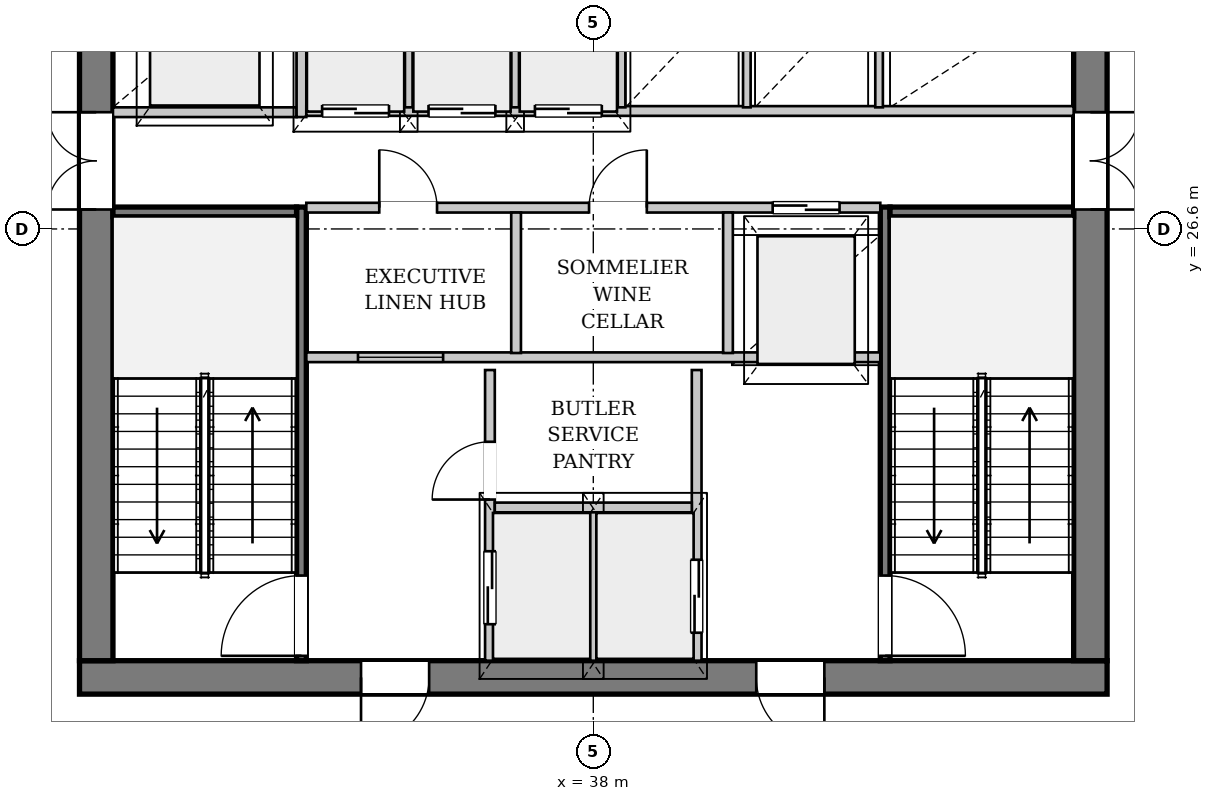
"""IFC4 building model, lengths in metres.
Left out: names, types, materials, properties, quantities, classifications, styles, units other than length and angle.
Written with IfcOpenShell. Run it as: python <this file> out.ifc"""

import sys

from ifc_helpers import new_model, si_unit, direction, frame, frame_2d, origin, place, context, subcontext, project, spatial, rectangle, extrude, source, transform, mapped, element, fill, save


model = new_model("IFC4")
c1 = context("Model", 3, precision=1e-05, world=origin(), true_north=direction((0.0, 1.0)))
c2 = subcontext(c1, "Body", "Model", "MODEL_VIEW")
j1 = project(units=[si_unit("LENGTHUNIT", "METRE"), si_unit("PLANEANGLEUNIT", "RADIAN")], contexts=[c1])
p1 = place(None, origin())
s1 = spatial("IfcSite", under=j1, at=p1, CompositionType="ELEMENT")
p2 = place(p1, origin())
s2 = spatial("IfcBuilding", under=s1, at=p2, CompositionType="ELEMENT")
p3 = place(p2, frame((0.0, 0.0, 196.3)))
s3 = spatial("IfcBuildingStorey", under=s2, at=p3, CompositionType="ELEMENT", Elevation=196.3)
p4 = place(p3, frame((46.45, 19.225, 0.0), z_axis=(0.0, 0.0, 1.0), x_axis=(-1.0, 0.0, 0.0)))
e1 = element("IfcWall", 1, at=p4, inside=s3, PredefinedType="SHEAR", context=c2, shape_type="SweptSolid", body=[
    extrude(rectangle(XDim=16.9, YDim=0.55, at=frame_2d((8.45, 0.0))), origin(), (0.0, 0.0, 1.0), 3.78),
])
p5 = place(p4, frame((4.65, 0.0, 0.0)))
e2 = element("IfcOpeningElement", 2, at=p5, cuts=e1, PredefinedType="OPENING", context=c2, shape_type="SweptSolid", body=[
    extrude(rectangle(XDim=1.12, YDim=2.25, at=frame_2d((0.56, 1.125))), frame((0.0, 0.285, 0.0), z_axis=(0.0, -1.0, 0.0), x_axis=(1.0, 0.0, 0.0)), (0.0, 0.0, 1.0), 0.57),
])
p6 = place(p4, frame((11.15, 0.0, 0.0)))
e3 = element("IfcOpeningElement", 3, at=p6, cuts=e1, PredefinedType="OPENING", context=c2, shape_type="SweptSolid", body=[
    extrude(rectangle(XDim=1.12, YDim=2.25, at=frame_2d((0.56, 1.125))), frame((0.0, 0.285, 0.0), z_axis=(0.0, -1.0, 0.0), x_axis=(1.0, 0.0, 0.0)), (0.0, 0.0, 1.0), 0.57),
])
p7 = place(p3, frame((29.825, 19.5, 0.0), z_axis=(0.0, 0.0, 1.0), x_axis=(0.0, 1.0, 0.0)))
e4 = element("IfcWall", 4, at=p7, inside=s3, PredefinedType="SHEAR", context=c2, shape_type="SweptSolid", body=[
    extrude(rectangle(XDim=14.2, YDim=0.55, at=frame_2d((7.1, 0.0))), origin(), (0.0, 0.0, 1.0), 3.78),
])
p8 = place(p7, frame((7.42, 0.0, 0.0)))
e5 = element("IfcOpeningElement", 5, at=p8, cuts=e4, PredefinedType="OPENING", context=c2, shape_type="SweptSolid", body=[
    extrude(rectangle(XDim=1.6, YDim=2.2, at=frame_2d((0.8, 1.1))), frame((0.0, 0.285, 0.0), z_axis=(0.0, -1.0, 0.0), x_axis=(1.0, 0.0, 0.0)), (0.0, 0.0, 1.0), 0.57),
])
p9 = place(p3, frame((46.175, 33.7, 0.0), z_axis=(0.0, 0.0, 1.0), x_axis=(0.0, -1.0, 0.0)))
e6 = element("IfcWall", 6, at=p9, inside=s3, PredefinedType="SHEAR", context=c2, shape_type="SweptSolid", body=[
    extrude(rectangle(XDim=14.2, YDim=0.55, at=frame_2d((7.1, 0.0))), origin(), (0.0, 0.0, 1.0), 3.78),
])
p10 = place(p9, frame((5.18, 0.0, 0.0)))
e7 = element("IfcOpeningElement", 7, at=p10, cuts=e6, PredefinedType="OPENING", context=c2, shape_type="SweptSolid", body=[
    extrude(rectangle(XDim=1.6, YDim=2.2, at=frame_2d((0.8, 1.1))), frame((0.0, 0.285, 0.0), z_axis=(0.0, -1.0, 0.0), x_axis=(1.0, 0.0, 0.0)), (0.0, 0.0, 1.0), 0.57),
])
p11 = place(p9, frame((2.05, 0.0, 0.0)))
e8 = element("IfcOpeningElement", 8, at=p11, cuts=e6, PredefinedType="OPENING", context=c2, shape_type="SweptSolid", body=[
    extrude(rectangle(XDim=0.95, YDim=2.1, at=frame_2d((0.475, 1.05))), frame((0.0, 0.285, 0.0), z_axis=(0.0, -1.0, 0.0), x_axis=(1.0, 0.0, 0.0)), (0.0, 0.0, 1.0), 0.57),
])
p12 = place(p3, frame((33.2, 19.5, 0.0), z_axis=(0.0, 0.0, 1.0), x_axis=(0.0, 1.0, 0.0)))
e9 = element("IfcWall", 9, at=p12, inside=s3, PredefinedType="PARTITIONING", context=c2, shape_type="SweptSolid", body=[
    extrude(rectangle(XDim=7.46, YDim=0.16, at=frame_2d((3.73, 0.0))), origin(), (0.0, 0.0, 1.0), 3.78),
])
p13 = place(p12, frame((0.08, 0.0, 0.0)))
e10 = element("IfcOpeningElement", 10, at=p13, cuts=e9, PredefinedType="OPENING", context=c2, shape_type="SweptSolid", body=[
    extrude(rectangle(XDim=1.32, YDim=2.2, at=frame_2d((0.66, 1.1))), frame((0.0, 0.09, 0.0), z_axis=(0.0, -1.0, 0.0), x_axis=(1.0, 0.0, 0.0)), (0.0, 0.0, 1.0), 0.18),
])
p14 = place(p3, frame((30.1, 26.88, 0.0), z_axis=(0.0, 0.0, 1.0), x_axis=(1.0, 0.0, 0.0)))
e11 = element("IfcWall", 11, at=p14, inside=s3, PredefinedType="PARTITIONING", context=c2, shape_type="SweptSolid", body=[
    extrude(rectangle(XDim=3.02, YDim=0.16, at=frame_2d((1.51, 0.0))), origin(), (0.0, 0.0, 1.0), 3.78),
])
p15 = place(p3, frame((42.8, 26.96, 0.0), z_axis=(0.0, 0.0, 1.0), x_axis=(0.0, -1.0, 0.0)))
e12 = element("IfcWall", 12, at=p15, inside=s3, PredefinedType="PARTITIONING", context=c2, shape_type="SweptSolid", body=[
    extrude(rectangle(XDim=7.46, YDim=0.16, at=frame_2d((3.73, 0.0))), origin(), (0.0, 0.0, 1.0), 3.78),
])
p16 = place(p15, frame((6.06, 0.0, 0.0)))
e13 = element("IfcOpeningElement", 13, at=p16, cuts=e12, PredefinedType="OPENING", context=c2, shape_type="SweptSolid", body=[
    extrude(rectangle(XDim=1.32, YDim=2.2, at=frame_2d((0.66, 1.1))), frame((0.0, 0.09, 0.0), z_axis=(0.0, -1.0, 0.0), x_axis=(1.0, 0.0, 0.0)), (0.0, 0.0, 1.0), 0.18),
])
p17 = place(p3, frame((42.88, 26.88, 0.0), z_axis=(0.0, 0.0, 1.0), x_axis=(1.0, 0.0, 0.0)))
e14 = element("IfcWall", 14, at=p17, inside=s3, PredefinedType="PARTITIONING", context=c2, shape_type="SweptSolid", body=[
    extrude(rectangle(XDim=3.02, YDim=0.16, at=frame_2d((1.51, 0.0))), origin(), (0.0, 0.0, 1.0), 3.78),
])
p18 = place(p3, frame((36.3, 19.5, 0.0), z_axis=(0.0, 0.0, 1.0), x_axis=(0.0, 1.0, 0.0)))
e15 = element("IfcWall", 15, at=p18, inside=s3, PredefinedType="PARTITIONING", context=c2, shape_type="SweptSolid", body=[
    extrude(rectangle(XDim=4.78, YDim=0.16, at=frame_2d((2.39, 0.0))), origin(), (0.0, 0.0, 1.0), 3.78),
])
p19 = place(p18, frame((0.6, 0.0, 0.0)))
e16 = element("IfcOpeningElement", 16, at=p19, cuts=e15, PredefinedType="OPENING", context=c2, shape_type="SweptSolid", body=[
    extrude(rectangle(XDim=1.2, YDim=2.2, at=frame_2d((0.6, 1.1))), frame((0.0, 0.09, 0.0), z_axis=(0.0, -1.0, 0.0), x_axis=(1.0, 0.0, 0.0)), (0.0, 0.0, 1.0), 0.18),
])
p20 = place(p18, frame((2.65, 0.0, 0.0)))
e17 = element("IfcOpeningElement", 17, at=p20, cuts=e15, PredefinedType="OPENING", context=c2, shape_type="SweptSolid", body=[
    extrude(rectangle(XDim=0.95, YDim=2.1, at=frame_2d((0.475, 1.05))), frame((0.0, 0.09, 0.0), z_axis=(0.0, -1.0, 0.0), x_axis=(1.0, 0.0, 0.0)), (0.0, 0.0, 1.0), 0.18),
])
p21 = place(p3, frame((39.7, 24.28, 0.0), z_axis=(0.0, 0.0, 1.0), x_axis=(0.0, -1.0, 0.0)))
e18 = element("IfcWall", 18, at=p21, inside=s3, PredefinedType="PARTITIONING", context=c2, shape_type="SweptSolid", body=[
    extrude(rectangle(XDim=4.78, YDim=0.16, at=frame_2d((2.39, 0.0))), origin(), (0.0, 0.0, 1.0), 3.78),
])
p22 = place(p21, frame((3.12, 0.0, 0.0)))
e19 = element("IfcOpeningElement", 19, at=p22, cuts=e18, PredefinedType="OPENING", context=c2, shape_type="SweptSolid", body=[
    extrude(rectangle(XDim=1.2, YDim=2.2, at=frame_2d((0.6, 1.1))), frame((0.0, 0.09, 0.0), z_axis=(0.0, -1.0, 0.0), x_axis=(1.0, 0.0, 0.0)), (0.0, 0.0, 1.0), 0.18),
])
p23 = place(p3, frame((38.0, 19.5, 0.0), z_axis=(0.0, 0.0, 1.0), x_axis=(0.0, 1.0, 0.0)))
e20 = element("IfcWall", 20, at=p23, inside=s3, PredefinedType="PARTITIONING", context=c2, shape_type="SweptSolid", body=[
    extrude(rectangle(XDim=2.46, YDim=0.125, at=frame_2d((1.23, 0.0))), origin(), (0.0, 0.0, 1.0), 3.78),
])
p24 = place(p3, frame((36.38, 22.02, 0.0), z_axis=(0.0, 0.0, 1.0), x_axis=(1.0, 0.0, 0.0)))
e21 = element("IfcWall", 21, at=p24, inside=s3, PredefinedType="PARTITIONING", context=c2, shape_type="SweptSolid", body=[
    extrude(rectangle(XDim=3.24, YDim=0.16, at=frame_2d((1.62, 0.0))), origin(), (0.0, 0.0, 1.0), 3.78),
])
p25 = place(p3, frame((33.28, 24.49, 0.0), z_axis=(0.0, 0.0, 1.0), x_axis=(1.0, 0.0, 0.0)))
e22 = element("IfcWall", 22, at=p25, inside=s3, PredefinedType="PARTITIONING", context=c2, shape_type="SweptSolid", body=[
    extrude(rectangle(XDim=9.44, YDim=0.16, at=frame_2d((4.72, 0.0))), origin(), (0.0, 0.0, 1.0), 3.78),
])
p26 = place(p25, frame((0.85, 0.0, 0.95)))
e23 = element("IfcOpeningElement", 23, at=p26, cuts=e22, PredefinedType="OPENING", context=c2, shape_type="SweptSolid", body=[
    extrude(rectangle(XDim=1.4, YDim=1.8, at=frame_2d((0.7, 0.9))), frame((0.0, 0.09, 0.0), z_axis=(0.0, -1.0, 0.0), x_axis=(1.0, 0.0, 0.0)), (0.0, 0.0, 1.0), 0.18),
])
p27 = place(p3, frame((30.1, 28.52, 0.0), z_axis=(0.0, 0.0, 1.0), x_axis=(1.0, 0.0, 0.0)))
e24 = element("IfcWall", 24, at=p27, inside=s3, PredefinedType="PARTITIONING", context=c2, shape_type="SweptSolid", body=[
    extrude(rectangle(XDim=3.02, YDim=0.16, at=frame_2d((1.51, 0.0))), origin(), (0.0, 0.0, 1.0), 3.78),
])
p28 = place(p3, frame((33.2, 28.44, 0.0), z_axis=(0.0, 0.0, 1.0), x_axis=(0.0, 1.0, 0.0)))
e25 = element("IfcWall", 25, at=p28, inside=s3, PredefinedType="PARTITIONING", context=c2, shape_type="SweptSolid", body=[
    extrude(rectangle(XDim=5.26, YDim=0.16, at=frame_2d((2.63, 0.0))), origin(), (0.0, 0.0, 1.0), 3.78),
])
p29 = place(p3, frame((33.28, 26.95, 0.0), z_axis=(0.0, 0.0, 1.0), x_axis=(1.0, 0.0, 0.0)))
e26 = element("IfcWall", 26, at=p29, inside=s3, PredefinedType="PARTITIONING", context=c2, shape_type="SweptSolid", body=[
    extrude(rectangle(XDim=9.44, YDim=0.16, at=frame_2d((4.72, 0.0))), origin(), (0.0, 0.0, 1.0), 3.78),
])
p30 = place(p29, frame((1.2, 0.0, 0.0)))
e27 = element("IfcOpeningElement", 27, at=p30, cuts=e26, PredefinedType="OPENING", context=c2, shape_type="SweptSolid", body=[
    extrude(rectangle(XDim=0.95, YDim=2.1, at=frame_2d((0.475, 1.05))), frame((0.0, 0.09, 0.0), z_axis=(0.0, -1.0, 0.0), x_axis=(1.0, 0.0, 0.0)), (0.0, 0.0, 1.0), 0.18),
])
p31 = place(p29, frame((4.65, 0.0, 0.0)))
e28 = element("IfcOpeningElement", 28, at=p31, cuts=e26, PredefinedType="OPENING", context=c2, shape_type="SweptSolid", body=[
    extrude(rectangle(XDim=0.95, YDim=2.1, at=frame_2d((0.475, 1.05))), frame((0.0, 0.09, 0.0), z_axis=(0.0, -1.0, 0.0), x_axis=(1.0, 0.0, 0.0)), (0.0, 0.0, 1.0), 0.18),
])
p32 = place(p29, frame((7.67, 0.0, 0.0)))
e29 = element("IfcOpeningElement", 29, at=p32, cuts=e26, PredefinedType="OPENING", context=c2, shape_type="SweptSolid", body=[
    extrude(rectangle(XDim=1.1, YDim=2.2, at=frame_2d((0.55, 1.1))), frame((0.0, 0.09, 0.0), z_axis=(0.0, -1.0, 0.0), x_axis=(1.0, 0.0, 0.0)), (0.0, 0.0, 1.0), 0.18),
])
for number, where, z_axis, x_axis in (
    (30, (36.73, 24.56, 0.0), (0.0, 0.0, 1.0), (0.0, 1.0, 0.0)),
    (31, (40.215, 24.56, 0.0), (0.0, 0.0, 1.0), (0.0, 1.0, 0.0)),
):
    element("IfcWall", number, at=place(p3, frame(where, z_axis=z_axis, x_axis=x_axis)), inside=s3, PredefinedType="PARTITIONING", context=c2, shape_type="SweptSolid", body=[
        extrude(rectangle(XDim=2.31, YDim=0.16, at=frame_2d((1.155, 0.0))), origin(), (0.0, 0.0, 1.0), 3.78),
    ])
p33 = place(p3, frame((33.28, 28.54, 0.0), z_axis=(0.0, 0.0, 1.0), x_axis=(1.0, 0.0, 0.0)))
e32 = element("IfcWall", 32, at=p33, inside=s3, PredefinedType="PARTITIONING", context=c2, shape_type="SweptSolid", body=[
    extrude(rectangle(XDim=12.62, YDim=0.16, at=frame_2d((6.31, 0.0))), origin(), (0.0, 0.0, 1.0), 3.78),
])
p34 = place(p33, frame((0.26, 0.0, 0.0)))
e33 = element("IfcOpeningElement", 33, at=p34, cuts=e32, PredefinedType="OPENING", context=c2, shape_type="SweptSolid", body=[
    extrude(rectangle(XDim=1.1, YDim=2.2, at=frame_2d((0.55, 1.1))), frame((0.0, 0.09, 0.0), z_axis=(0.0, -1.0, 0.0), x_axis=(1.0, 0.0, 0.0)), (0.0, 0.0, 1.0), 0.18),
])
p35 = place(p33, frame((2.01, 0.0, 0.0)))
e34 = element("IfcOpeningElement", 34, at=p35, cuts=e32, PredefinedType="OPENING", context=c2, shape_type="SweptSolid", body=[
    extrude(rectangle(XDim=1.1, YDim=2.2, at=frame_2d((0.55, 1.1))), frame((0.0, 0.09, 0.0), z_axis=(0.0, -1.0, 0.0), x_axis=(1.0, 0.0, 0.0)), (0.0, 0.0, 1.0), 0.18),
])
p36 = place(p33, frame((3.76, 0.0, 0.0)))
e35 = element("IfcOpeningElement", 35, at=p36, cuts=e32, PredefinedType="OPENING", context=c2, shape_type="SweptSolid", body=[
    extrude(rectangle(XDim=1.1, YDim=2.2, at=frame_2d((0.55, 1.1))), frame((0.0, 0.09, 0.0), z_axis=(0.0, -1.0, 0.0), x_axis=(1.0, 0.0, 0.0)), (0.0, 0.0, 1.0), 0.18),
])
for number, where, z_axis, x_axis in (
    (36, (34.965, 28.6, 0.0), (0.0, 0.0, 1.0), (0.0, 1.0, 0.0)),
    (37, (36.715, 28.6, 0.0), (0.0, 0.0, 1.0), (0.0, 1.0, 0.0)),
    (38, (38.465, 28.6, 0.0), (0.0, 0.0, 1.0), (0.0, 1.0, 0.0)),
    (39, (40.525, 28.6, 0.0), (0.0, 0.0, 1.0), (0.0, 1.0, 0.0)),
    (40, (42.7, 28.6, 0.0), (0.0, 0.0, 1.0), (0.0, 1.0, 0.0)),
):
    element("IfcWall", number, at=place(p3, frame(where, z_axis=z_axis, x_axis=x_axis)), inside=s3, PredefinedType="PARTITIONING", context=c2, shape_type="SweptSolid", body=[
        extrude(rectangle(XDim=1.92, YDim=0.125, at=frame_2d((0.96, 0.0))), origin(), (0.0, 0.0, 1.0), 3.78),
    ])
m1 = source(origin(), c2, "Body", "SweptSolid", [
    extrude(rectangle(XDim=1.12, YDim=2.25, at=frame_2d((0.56, 1.125))), frame((0.0, 0.025, 0.0), z_axis=(0.0, -1.0, 0.0), x_axis=(1.0, 0.0, 0.0)), (0.0, 0.0, 1.0), 0.05),
])
p37 = place(p5, origin())
e41 = element("IfcDoor", 41, at=p37, inside=s3, OperationType="SINGLE_SWING_LEFT", PredefinedType="DOOR", context=c2, shape_type="MappedRepresentation", body=[
    mapped(m1, transform((0.0, 0.0, 0.0), x_axis=(1.0, 0.0, 0.0), y_axis=(0.0, 1.0, 0.0), z_axis=(0.0, 0.0, 1.0), scale=1.0)),
])
fill(e2, e41)
p38 = place(p6, origin())
e42 = element("IfcDoor", 42, at=p38, inside=s3, OperationType="SINGLE_SWING_RIGHT", PredefinedType="DOOR", context=c2, shape_type="MappedRepresentation", body=[
    mapped(m1, transform((0.0, 0.0, 0.0), x_axis=(1.0, 0.0, 0.0), y_axis=(0.0, 1.0, 0.0), z_axis=(0.0, 0.0, 1.0), scale=1.0)),
])
fill(e3, e42)
m2 = source(origin(), c2, "Body", "SweptSolid", [
    extrude(rectangle(XDim=1.6, YDim=2.2, at=frame_2d((0.8, 1.1))), frame((0.0, 0.025, 0.0), z_axis=(0.0, -1.0, 0.0), x_axis=(1.0, 0.0, 0.0)), (0.0, 0.0, 1.0), 0.05),
])
p39 = place(p8, origin())
e43 = element("IfcDoor", 43, at=p39, inside=s3, OperationType="DOUBLE_DOOR_SINGLE_SWING", PredefinedType="DOOR", context=c2, shape_type="MappedRepresentation", body=[
    mapped(m2, transform((0.0, 0.0, 0.0), x_axis=(1.0, 0.0, 0.0), y_axis=(0.0, 1.0, 0.0), z_axis=(0.0, 0.0, 1.0), scale=1.0)),
])
fill(e5, e43)
p40 = place(p10, origin())
e44 = element("IfcDoor", 44, at=p40, inside=s3, OperationType="DOUBLE_DOOR_SINGLE_SWING", PredefinedType="DOOR", context=c2, shape_type="MappedRepresentation", body=[
    mapped(m2, transform((0.0, 0.0, 0.0), x_axis=(1.0, 0.0, 0.0), y_axis=(0.0, 1.0, 0.0), z_axis=(0.0, 0.0, 1.0), scale=1.0)),
])
fill(e7, e44)
m3 = source(origin(), c2, "Body", "SweptSolid", [
    extrude(rectangle(XDim=1.32, YDim=2.2, at=frame_2d((0.66, 1.1))), frame((0.0, 0.025, 0.0), z_axis=(0.0, -1.0, 0.0), x_axis=(1.0, 0.0, 0.0)), (0.0, 0.0, 1.0), 0.05),
])
p41 = place(p13, origin())
e45 = element("IfcDoor", 45, at=p41, inside=s3, OperationType="SINGLE_SWING_LEFT", PredefinedType="DOOR", context=c2, shape_type="MappedRepresentation", body=[
    mapped(m3, transform((0.0, 0.0, 0.0), x_axis=(1.0, 0.0, 0.0), y_axis=(0.0, 1.0, 0.0), z_axis=(0.0, 0.0, 1.0), scale=1.0)),
])
fill(e10, e45)
p42 = place(p16, origin())
e46 = element("IfcDoor", 46, at=p42, inside=s3, OperationType="SINGLE_SWING_RIGHT", PredefinedType="DOOR", context=c2, shape_type="MappedRepresentation", body=[
    mapped(m3, transform((0.0, 0.0, 0.0), x_axis=(1.0, 0.0, 0.0), y_axis=(0.0, 1.0, 0.0), z_axis=(0.0, 0.0, 1.0), scale=1.0)),
])
fill(e13, e46)
m4 = source(origin(), c2, "Body", "SweptSolid", [
    extrude(rectangle(XDim=1.2, YDim=2.2, at=frame_2d((0.6, 1.1))), frame((0.0, 0.025, 0.0), z_axis=(0.0, -1.0, 0.0), x_axis=(1.0, 0.0, 0.0)), (0.0, 0.0, 1.0), 0.05),
])
p43 = place(p19, origin())
e47 = element("IfcDoor", 47, at=p43, inside=s3, OperationType="DOUBLE_DOOR_SLIDING", PredefinedType="DOOR", context=c2, shape_type="MappedRepresentation", body=[
    mapped(m4, transform((0.0, 0.0, 0.0), x_axis=(1.0, 0.0, 0.0), y_axis=(0.0, 1.0, 0.0), z_axis=(0.0, 0.0, 1.0), scale=1.0)),
])
fill(e16, e47)
m5 = source(origin(), c2, "Body", "SweptSolid", [
    extrude(rectangle(XDim=0.95, YDim=2.1, at=frame_2d((0.475, 1.05))), frame((0.0, 0.025, 0.0), z_axis=(0.0, -1.0, 0.0), x_axis=(1.0, 0.0, 0.0)), (0.0, 0.0, 1.0), 0.05),
])
p44 = place(p20, origin())
e48 = element("IfcDoor", 48, at=p44, inside=s3, OperationType="SINGLE_SWING_LEFT", PredefinedType="DOOR", context=c2, shape_type="MappedRepresentation", body=[
    mapped(m5, transform((0.0, 0.0, 0.0), x_axis=(1.0, 0.0, 0.0), y_axis=(0.0, 1.0, 0.0), z_axis=(0.0, 0.0, 1.0), scale=1.0)),
])
fill(e17, e48)
p45 = place(p22, origin())
e49 = element("IfcDoor", 49, at=p45, inside=s3, OperationType="DOUBLE_DOOR_SLIDING", PredefinedType="DOOR", context=c2, shape_type="MappedRepresentation", body=[
    mapped(m4, transform((0.0, 0.0, 0.0), x_axis=(1.0, 0.0, 0.0), y_axis=(0.0, 1.0, 0.0), z_axis=(0.0, 0.0, 1.0), scale=1.0)),
])
fill(e19, e49)
p46 = place(p30, origin())
e50 = element("IfcDoor", 50, at=p46, inside=s3, OperationType="SINGLE_SWING_LEFT", PredefinedType="DOOR", context=c2, shape_type="MappedRepresentation", body=[
    mapped(m5, transform((0.0, 0.0, 0.0), x_axis=(1.0, 0.0, 0.0), y_axis=(0.0, 1.0, 0.0), z_axis=(0.0, 0.0, 1.0), scale=1.0)),
])
fill(e27, e50)
p47 = place(p31, origin())
e51 = element("IfcDoor", 51, at=p47, inside=s3, OperationType="SINGLE_SWING_RIGHT", PredefinedType="DOOR", context=c2, shape_type="MappedRepresentation", body=[
    mapped(m5, transform((0.0, 0.0, 0.0), x_axis=(1.0, 0.0, 0.0), y_axis=(0.0, 1.0, 0.0), z_axis=(0.0, 0.0, 1.0), scale=1.0)),
])
fill(e28, e51)
m6 = source(origin(), c2, "Body", "SweptSolid", [
    extrude(rectangle(XDim=1.1, YDim=2.2, at=frame_2d((0.55, 1.1))), frame((0.0, 0.025, 0.0), z_axis=(0.0, -1.0, 0.0), x_axis=(1.0, 0.0, 0.0)), (0.0, 0.0, 1.0), 0.05),
])
p48 = place(p32, origin())
e52 = element("IfcDoor", 52, at=p48, inside=s3, OperationType="DOUBLE_DOOR_SLIDING", PredefinedType="DOOR", context=c2, shape_type="MappedRepresentation", body=[
    mapped(m6, transform((0.0, 0.0, 0.0), x_axis=(1.0, 0.0, 0.0), y_axis=(0.0, 1.0, 0.0), z_axis=(0.0, 0.0, 1.0), scale=1.0)),
])
fill(e29, e52)
p49 = place(p34, origin())
e53 = element("IfcDoor", 53, at=p49, inside=s3, OperationType="DOUBLE_DOOR_SLIDING", PredefinedType="DOOR", context=c2, shape_type="MappedRepresentation", body=[
    mapped(m6, transform((0.0, 0.0, 0.0), x_axis=(1.0, 0.0, 0.0), y_axis=(0.0, 1.0, 0.0), z_axis=(0.0, 0.0, 1.0), scale=1.0)),
])
fill(e33, e53)
p50 = place(p35, origin())
e54 = element("IfcDoor", 54, at=p50, inside=s3, OperationType="DOUBLE_DOOR_SLIDING", PredefinedType="DOOR", context=c2, shape_type="MappedRepresentation", body=[
    mapped(m6, transform((0.0, 0.0, 0.0), x_axis=(1.0, 0.0, 0.0), y_axis=(0.0, 1.0, 0.0), z_axis=(0.0, 0.0, 1.0), scale=1.0)),
])
fill(e34, e54)
p51 = place(p36, origin())
e55 = element("IfcDoor", 55, at=p51, inside=s3, OperationType="DOUBLE_DOOR_SLIDING", PredefinedType="DOOR", context=c2, shape_type="MappedRepresentation", body=[
    mapped(m6, transform((0.0, 0.0, 0.0), x_axis=(1.0, 0.0, 0.0), y_axis=(0.0, 1.0, 0.0), z_axis=(0.0, 0.0, 1.0), scale=1.0)),
])
fill(e35, e55)
m7 = source(origin(), c2, "Body", "SweptSolid", [
    extrude(rectangle(XDim=1.4, YDim=1.8, at=frame_2d((0.7, 0.9))), frame((0.0, 0.03, 0.0), z_axis=(0.0, -1.0, 0.0), x_axis=(1.0, 0.0, 0.0)), (0.0, 0.0, 1.0), 0.06),
])
p52 = place(p26, origin())
e56 = element("IfcWindow", 56, at=p52, inside=s3, PartitioningType="SINGLE_PANEL", PredefinedType="WINDOW", context=c2, shape_type="MappedRepresentation", body=[
    mapped(m7, transform((0.0, 0.0, 0.0), x_axis=(1.0, 0.0, 0.0), y_axis=(0.0, 1.0, 0.0), z_axis=(0.0, 0.0, 1.0), scale=1.0)),
])
fill(e23, e56)
save(model, sys.argv[1])
